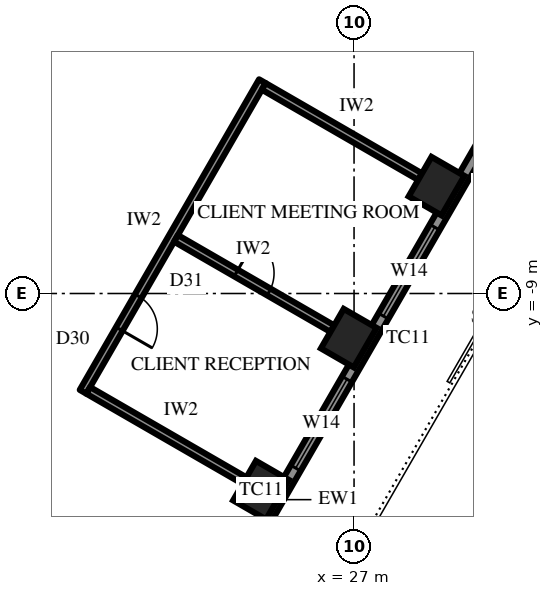
"""IFC4 building model, lengths in metres.
Left out: names, types, materials, properties, quantities, classifications, styles, units other than length and angle.
Written with IfcOpenShell. Run it as: python <this file> out.ifc"""

import sys

from ifc_helpers import new_model, si_unit, direction, frame, frame_2d, origin, origin_2d, place, context, subcontext, project, spatial, rectangle, extrude, element, fill, save


model = new_model("IFC4")
c1 = context("Model", 3, precision=1e-05, world=origin(), true_north=direction((0.0, 1.0)))
c2 = subcontext(c1, "Body", "Model", "MODEL_VIEW")
j1 = project(units=[si_unit("LENGTHUNIT", "METRE"), si_unit("PLANEANGLEUNIT", "RADIAN")], contexts=[c1])
p1 = place(None, origin())
s1 = spatial("IfcSite", under=j1, at=p1, CompositionType="ELEMENT")
p2 = place(p1, origin())
s2 = spatial("IfcBuilding", under=s1, at=p2, CompositionType="ELEMENT")
p3 = place(p2, frame((0.0, 0.0, 261.7)))
s3 = spatial("IfcBuildingStorey", under=s2, at=p3, CompositionType="ELEMENT", Elevation=261.7)
for number, where, z_axis, x_axis in (
    (1, (24.552, -14.175, 0.0), (0.0, 0.0, 1.0), (0.5, 0.866, 0.0)),
    (2, (26.861, -10.175, 0.0), (0.0, 0.0, 1.0), (0.5, 0.866, 0.0)),
    (3, (29.171, -6.175, 0.0), (0.0, 0.0, 1.0), (0.5, 0.866, 0.0)),
):
    element("IfcColumn", number, at=place(p3, frame(where, z_axis=z_axis, x_axis=x_axis)), inside=s3, PredefinedType="COLUMN", context=c2, shape_type="SweptSolid", body=[
        extrude(rectangle(XDim=1.2, YDim=1.0, at=origin_2d()), origin(), (0.0, 0.0, 1.0), 4.2),
    ])
p4 = place(p3, frame((18.707, -25.299, 0.0), z_axis=(0.0, 0.0, 1.0), x_axis=(0.500000442367, 0.866025148383, 0.0)))
e4 = element("IfcWall", 4, at=p4, inside=s3, PredefinedType="SOLIDWALL", context=c2, shape_type="SweptSolid", body=[
    extrude(rectangle(XDim=25.113, YDim=0.3, at=frame_2d((12.556, 0.0))), origin(), (0.0, 0.0, 1.0), 2.8),
])
p5 = place(p4, frame((4.278, 0.0, 0.6)))
e5 = element("IfcOpeningElement", 5, at=p5, cuts=e4, PredefinedType="OPENING", context=c2, shape_type="SweptSolid", body=[
    extrude(rectangle(XDim=2.7, YDim=1.95, at=frame_2d((1.35, 0.975))), frame((0.0, 0.16, 0.0), z_axis=(0.0, -1.0, 0.0), x_axis=(1.0, 0.0, 0.0)), (0.0, 0.0, 1.0), 0.32),
])
p6 = place(p4, frame((9.647, 0.0, 0.0)))
e6 = element("IfcOpeningElement", 6, at=p6, cuts=e4, PredefinedType="OPENING", context=c2, shape_type="SweptSolid", body=[
    extrude(rectangle(XDim=1.2, YDim=2.4, at=frame_2d((0.6, 1.2))), frame((0.0, 0.16, 0.0), z_axis=(0.0, -1.0, 0.0), x_axis=(1.0, 0.0, 0.0)), (0.0, 0.0, 1.0), 0.32),
])
p7 = place(p4, frame((13.516, 0.0, 0.6)))
e7 = element("IfcOpeningElement", 7, at=p7, cuts=e4, PredefinedType="OPENING", context=c2, shape_type="SweptSolid", body=[
    extrude(rectangle(XDim=2.7, YDim=1.95, at=frame_2d((1.35, 0.975))), frame((0.0, 0.16, 0.0), z_axis=(0.0, -1.0, 0.0), x_axis=(1.0, 0.0, 0.0)), (0.0, 0.0, 1.0), 0.32),
])
p8 = place(p4, frame((18.135, 0.0, 0.6)))
e8 = element("IfcOpeningElement", 8, at=p8, cuts=e4, PredefinedType="OPENING", context=c2, shape_type="SweptSolid", body=[
    extrude(rectangle(XDim=2.7, YDim=1.95, at=frame_2d((1.35, 0.975))), frame((0.0, 0.16, 0.0), z_axis=(0.0, -1.0, 0.0), x_axis=(1.0, 0.0, 0.0)), (0.0, 0.0, 1.0), 0.32),
])
p9 = place(p3, frame((19.869, -11.587, 0.0), z_axis=(0.0, 0.0, 1.0), x_axis=(0.499989672313, 0.866031366395, 0.0)))
e9 = element("IfcWall", 9, at=p9, inside=s3, PredefinedType="PARTITIONING", context=c2, shape_type="SweptSolid", body=[
    extrude(rectangle(XDim=9.438, YDim=0.2, at=frame_2d((4.719, 0.0))), origin(), (0.0, 0.0, 1.0), 4.0),
])
p10 = place(p9, frame((1.909, 0.0, 0.0)))
e10 = element("IfcOpeningElement", 10, at=p10, cuts=e9, PredefinedType="OPENING", context=c2, shape_type="SweptSolid", body=[
    extrude(rectangle(XDim=1.0, YDim=2.2, at=frame_2d((0.5, 1.1))), frame((0.0, 0.11, 0.0), z_axis=(0.0, -1.0, 0.0), x_axis=(1.0, 0.0, 0.0)), (0.0, 0.0, 1.0), 0.22),
])
p11 = place(p3, frame((20.005, -11.55, 0.0), z_axis=(0.0, 0.0, 1.0), x_axis=(0.866033238375, -0.499986429846, 0.0)))
e11 = element("IfcWall", 11, at=p11, inside=s3, PredefinedType="PARTITIONING", context=c2, shape_type="SweptSolid", body=[
    extrude(rectangle(XDim=4.75, YDim=0.2, at=frame_2d((2.375, 0.0))), origin(), (0.0, 0.0, 1.0), 3.082),
])
p12 = place(p3, frame((22.315, -7.55, 0.0), z_axis=(0.0, 0.0, 1.0), x_axis=(0.866020389056, -0.500008685663, 0.0)))
e12 = element("IfcWall", 12, at=p12, inside=s3, PredefinedType="PARTITIONING", context=c2, shape_type="SweptSolid", body=[
    extrude(rectangle(XDim=4.75, YDim=0.2, at=frame_2d((2.375, 0.0))), origin(), (0.0, 0.0, 1.0), 3.082),
])
p13 = place(p12, frame((1.825, 0.0, 0.0)))
e13 = element("IfcOpeningElement", 13, at=p13, cuts=e12, PredefinedType="OPENING", context=c2, shape_type="SweptSolid", body=[
    extrude(rectangle(XDim=1.0, YDim=2.2, at=frame_2d((0.5, 1.1))), frame((0.0, 0.11, 0.0), z_axis=(0.0, -1.0, 0.0), x_axis=(1.0, 0.0, 0.0)), (0.0, 0.0, 1.0), 0.22),
])
p14 = place(p3, frame((24.624, -3.55, 0.0), z_axis=(0.0, 0.0, 1.0), x_axis=(0.866020389056, -0.500008685663, 0.0)))
e14 = element("IfcWall", 14, at=p14, inside=s3, PredefinedType="PARTITIONING", context=c2, shape_type="SweptSolid", body=[
    extrude(rectangle(XDim=4.75, YDim=0.2, at=frame_2d((2.375, 0.0))), origin(), (0.0, 0.0, 1.0), 3.082),
])
p15 = place(p7, origin())
e15 = element("IfcWindow", 15, at=p15, inside=s3, PartitioningType="SINGLE_PANEL", PredefinedType="WINDOW", context=c2, shape_type="SweptSolid", body=[
    extrude(rectangle(XDim=2.7, YDim=1.95, at=frame_2d((1.35, 0.975))), frame((0.0, 0.03, 0.0), z_axis=(0.0, -1.0, 0.0), x_axis=(1.0, 0.0, 0.0)), (0.0, 0.0, 1.0), 0.06),
])
fill(e7, e15)
p16 = place(p8, origin())
e16 = element("IfcWindow", 16, at=p16, inside=s3, PartitioningType="SINGLE_PANEL", PredefinedType="WINDOW", context=c2, shape_type="SweptSolid", body=[
    extrude(rectangle(XDim=2.7, YDim=1.95, at=frame_2d((1.35, 0.975))), frame((0.0, 0.03, 0.0), z_axis=(0.0, -1.0, 0.0), x_axis=(1.0, 0.0, 0.0)), (0.0, 0.0, 1.0), 0.06),
])
fill(e8, e16)
p17 = place(p10, frame((1.0, 0.0, 0.0), z_axis=(0.0, 0.0, 1.0), x_axis=(-1.0, 0.0, 0.0)))
e17 = element("IfcDoor", 17, at=p17, inside=s3, OperationType="SINGLE_SWING_LEFT", PredefinedType="DOOR", context=c2, shape_type="SweptSolid", body=[
    extrude(rectangle(XDim=1.0, YDim=2.2, at=frame_2d((0.5, 1.1))), frame((0.0, 0.025, 0.0), z_axis=(0.0, -1.0, 0.0), x_axis=(1.0, 0.0, 0.0)), (0.0, 0.0, 1.0), 0.05),
])
fill(e10, e17)
p18 = place(p13, origin())
e18 = element("IfcDoor", 18, at=p18, inside=s3, OperationType="SINGLE_SWING_RIGHT", PredefinedType="DOOR", context=c2, shape_type="SweptSolid", body=[
    extrude(rectangle(XDim=1.0, YDim=2.2, at=frame_2d((0.5, 1.1))), frame((0.0, 0.025, 0.0), z_axis=(0.0, -1.0, 0.0), x_axis=(1.0, 0.0, 0.0)), (0.0, 0.0, 1.0), 0.05),
])
fill(e13, e18)
save(model, sys.argv[1])
